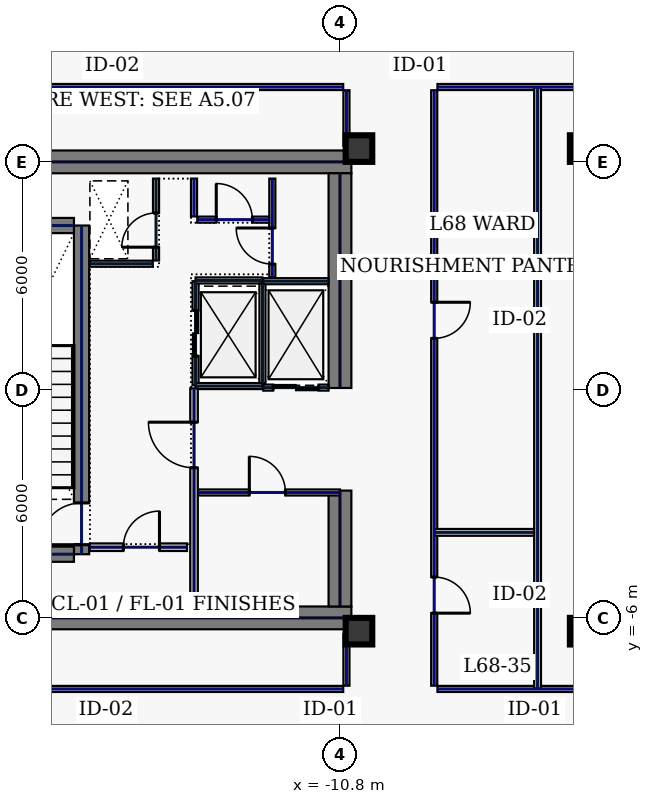
"""IFC4 building model, lengths in metres.
Left out: names, types, materials, properties, quantities, classifications, styles, units other than length and angle.
Written with IfcOpenShell. Run it as: python <this file> out.ifc"""

import sys

from ifc_helpers import new_model, si_unit, direction, frame, frame_2d, origin, origin_2d, place, context, subcontext, project, spatial, rectangle, hollow_rectangle, extrude, element, fill, save


model = new_model("IFC4")
c1 = context("Model", 3, precision=1e-05, world=origin(), true_north=direction((0.0, 1.0)))
c2 = subcontext(c1, "Body", "Model", "MODEL_VIEW")
j1 = project(units=[si_unit("LENGTHUNIT", "METRE"), si_unit("PLANEANGLEUNIT", "RADIAN")], contexts=[c1])
p1 = place(None, origin())
s1 = spatial("IfcSite", under=j1, at=p1, CompositionType="ELEMENT")
p2 = place(p1, origin())
s2 = spatial("IfcBuilding", under=s1, at=p2, CompositionType="ELEMENT")
p3 = place(p2, frame((0.0, 0.0, 293.0)))
s3 = spatial("IfcBuildingStorey", under=s2, at=p3, CompositionType="ELEMENT", Elevation=293.0)
for number, where, z_axis, x_axis in (
    (1, (-22.0, 6.0, 0.0), (0.0, 0.0, 1.0), (1.0, 0.0, 0.0)),
    (2, (-22.0, -6.0, 0.0), (0.0, 0.0, 1.0), (1.0, 0.0, 0.0)),
):
    element("IfcWall", number, at=place(p3, frame(where, z_axis=z_axis, x_axis=x_axis)), inside=s3, PredefinedType="SHEAR", context=c2, shape_type="SweptSolid", body=[
        extrude(rectangle(XDim=11.5, YDim=0.6, at=frame_2d((5.75, 0.0))), origin(), (0.0, 0.0, 1.0), 3.74),
    ])
p4 = place(p3, frame((-10.8, -5.7, 0.0), z_axis=(0.0, 0.0, 1.0), x_axis=(0.0, 1.0, 0.0)))
e3 = element("IfcWall", 3, at=p4, inside=s3, PredefinedType="SHEAR", context=c2, shape_type="SweptSolid", body=[
    extrude(rectangle(XDim=3.05, YDim=0.6, at=frame_2d((1.525, 0.0))), origin(), (0.0, 0.0, 1.0), 3.74),
])
p5 = place(p3, frame((-10.8, 0.05, 0.0), z_axis=(0.0, 0.0, 1.0), x_axis=(0.0, 1.0, 0.0)))
e4 = element("IfcWall", 4, at=p5, inside=s3, PredefinedType="SHEAR", context=c2, shape_type="SweptSolid", body=[
    extrude(rectangle(XDim=5.65, YDim=0.6, at=frame_2d((2.825, 0.0))), origin(), (0.0, 0.0, 1.0), 3.74),
])
p6 = place(p3, frame((-17.6, -4.325, 0.0), z_axis=(0.0, 0.0, 1.0), x_axis=(0.0, 1.0, 0.0)))
e5 = element("IfcWall", 5, at=p6, inside=s3, PredefinedType="SHEAR", context=c2, shape_type="SweptSolid", body=[
    extrude(rectangle(XDim=8.65, YDim=0.4, at=frame_2d((4.325, 0.0))), origin(), (0.0, 0.0, 1.0), 3.74),
])
p7 = place(p6, frame((0.25, 0.0, 0.0)))
e6 = element("IfcOpeningElement", 6, at=p7, cuts=e5, PredefinedType="OPENING", context=c2, shape_type="SweptSolid", body=[
    extrude(rectangle(XDim=1.1, YDim=2.2, at=frame_2d((0.55, 1.1))), frame((0.0, 0.21, 0.0), z_axis=(0.0, -1.0, 0.0), x_axis=(1.0, 0.0, 0.0)), (0.0, 0.0, 1.0), 0.42),
])
for number, where, z_axis, x_axis in (
    (7, (-21.2, -4.325, 0.0), (0.0, 0.0, 1.0), (1.0, 0.0, 0.0)),
    (8, (-21.2, 4.325, 0.0), (0.0, 0.0, 1.0), (1.0, 0.0, 0.0)),
):
    element("IfcWall", number, at=place(p3, frame(where, z_axis=z_axis, x_axis=x_axis)), inside=s3, PredefinedType="SHEAR", context=c2, shape_type="SweptSolid", body=[
        extrude(rectangle(XDim=3.4, YDim=0.4, at=frame_2d((1.7, 0.0))), origin(), (0.0, 0.0, 1.0), 3.74),
    ])
for number, where, z_axis, x_axis in (
    (9, (-10.3, -6.35, 0.0), (0.0, 0.0, 1.0), (1.0, 0.0, 0.0)),
    (10, (-10.3, 6.35, 0.0), (0.0, 0.0, 1.0), (1.0, 0.0, 0.0)),
    (11, (-4.4, -6.35, 0.0), (0.0, 0.0, 1.0), (1.0, 0.0, 0.0)),
    (12, (-4.4, 6.35, 0.0), (0.0, 0.0, 1.0), (1.0, 0.0, 0.0)),
):
    element("IfcColumn", number, at=place(p3, frame(where, z_axis=z_axis, x_axis=x_axis)), inside=s3, PredefinedType="COLUMN", context=c2, shape_type="SweptSolid", body=[
        extrude(hollow_rectangle(XDim=0.7, YDim=0.7, WallThickness=0.032, at=origin_2d()), origin(), (0.0, 0.0, 1.0), 3.74),
    ])
p8 = place(p3, frame((-14.6, 0.12, 0.0), z_axis=(0.0, 0.0, 1.0), x_axis=(0.0, 1.0, 0.0)))
e13 = element("IfcWall", 13, at=p8, inside=s3, PredefinedType="PARTITIONING", context=c2, shape_type="SweptSolid", body=[
    extrude(rectangle(XDim=2.74, YDim=0.16, at=frame_2d((1.37, 0.0))), origin(), (0.0, 0.0, 1.0), 3.74),
])
p9 = place(p8, frame((0.77, 0.0, 0.0)))
e14 = element("IfcOpeningElement", 14, at=p9, cuts=e13, PredefinedType="OPENING", context=c2, shape_type="SweptSolid", body=[
    extrude(rectangle(XDim=1.2, YDim=2.2, at=frame_2d((0.6, 1.1))), frame((0.0, 0.09, 0.0), z_axis=(0.0, -1.0, 0.0), x_axis=(1.0, 0.0, 0.0)), (0.0, 0.0, 1.0), 0.18),
])
for number, where, z_axis, x_axis in (
    (15, (-14.6, 0.1, 0.0), (0.0, 0.0, 1.0), (1.0, 0.0, 0.0)),
    (16, (-14.6, 2.88, 0.0), (0.0, 0.0, 1.0), (1.0, 0.0, 0.0)),
):
    element("IfcWall", number, at=place(p3, frame(where, z_axis=z_axis, x_axis=x_axis)), inside=s3, PredefinedType="PARTITIONING", context=c2, shape_type="SweptSolid", body=[
        extrude(rectangle(XDim=1.76, YDim=0.16, at=frame_2d((0.88, 0.0))), origin(), (0.0, 0.0, 1.0), 3.74),
    ])
p10 = place(p3, frame((-12.84, 0.18, 0.0), z_axis=(0.0, 0.0, 1.0), x_axis=(0.0, 1.0, 0.0)))
e17 = element("IfcWall", 17, at=p10, inside=s3, PredefinedType="PARTITIONING", context=c2, shape_type="SweptSolid", body=[
    extrude(rectangle(XDim=2.62, YDim=0.16, at=frame_2d((1.31, 0.0))), origin(), (0.0, 0.0, 1.0), 3.74),
])
p11 = place(p3, frame((-12.82, 0.06, 0.0), z_axis=(0.0, 0.0, 1.0), x_axis=(1.0, 0.0, 0.0)))
e18 = element("IfcWall", 18, at=p11, inside=s3, PredefinedType="PARTITIONING", context=c2, shape_type="SweptSolid", body=[
    extrude(rectangle(XDim=1.72, YDim=0.16, at=frame_2d((0.86, 0.0))), origin(), (0.0, 0.0, 1.0), 3.74),
])
p12 = place(p11, frame((0.26, 0.0, 0.0)))
e19 = element("IfcOpeningElement", 19, at=p12, cuts=e18, PredefinedType="OPENING", context=c2, shape_type="SweptSolid", body=[
    extrude(rectangle(XDim=1.2, YDim=2.2, at=frame_2d((0.6, 1.1))), frame((0.0, 0.09, 0.0), z_axis=(0.0, -1.0, 0.0), x_axis=(1.0, 0.0, 0.0)), (0.0, 0.0, 1.0), 0.18),
])
p13 = place(p3, frame((-12.82, 2.86, 0.0), z_axis=(0.0, 0.0, 1.0), x_axis=(1.0, 0.0, 0.0)))
e20 = element("IfcWall", 20, at=p13, inside=s3, PredefinedType="PARTITIONING", context=c2, shape_type="SweptSolid", body=[
    extrude(rectangle(XDim=1.72, YDim=0.16, at=frame_2d((0.86, 0.0))), origin(), (0.0, 0.0, 1.0), 3.74),
])
p14 = place(p3, frame((-15.64, 3.405, 0.0), z_axis=(0.0, 0.0, 1.0), x_axis=(0.0, 1.0, 0.0)))
e21 = element("IfcWall", 21, at=p14, inside=s3, PredefinedType="PARTITIONING", context=c2, shape_type="SweptSolid", body=[
    extrude(rectangle(XDim=2.155, YDim=0.16, at=frame_2d((1.078, 0.0))), origin(), (0.0, 0.0, 1.0), 3.74),
])
p15 = place(p14, frame((0.35, 0.0, 0.0)))
e22 = element("IfcOpeningElement", 22, at=p15, cuts=e21, PredefinedType="OPENING", context=c2, shape_type="SweptSolid", body=[
    extrude(rectangle(XDim=0.9, YDim=2.2, at=frame_2d((0.45, 1.1))), frame((0.0, 0.09, 0.0), z_axis=(0.0, -1.0, 0.0), x_axis=(1.0, 0.0, 0.0)), (0.0, 0.0, 1.0), 0.18),
])
p16 = place(p3, frame((-17.38, 3.32, 0.0), z_axis=(0.0, 0.0, 1.0), x_axis=(1.0, 0.0, 0.0)))
e23 = element("IfcWall", 23, at=p16, inside=s3, PredefinedType="PARTITIONING", context=c2, shape_type="SweptSolid", body=[
    extrude(rectangle(XDim=1.655, YDim=0.16, at=frame_2d((0.827, 0.0))), origin(), (0.0, 0.0, 1.0), 3.74),
])
p17 = place(p3, frame((-17.38, -4.14, 0.0), z_axis=(0.0, 0.0, 1.0), x_axis=(1.0, 0.0, 0.0)))
e24 = element("IfcWall", 24, at=p17, inside=s3, PredefinedType="SOLIDWALL", context=c2, shape_type="SweptSolid", body=[
    extrude(rectangle(XDim=2.555, YDim=0.2, at=frame_2d((1.277, 0.0))), origin(), (0.0, 0.0, 1.0), 3.74),
])
p18 = place(p17, frame((0.88, 0.0, 0.0)))
e25 = element("IfcOpeningElement", 25, at=p18, cuts=e24, PredefinedType="OPENING", context=c2, shape_type="SweptSolid", body=[
    extrude(rectangle(XDim=0.95, YDim=2.2, at=frame_2d((0.475, 1.1))), frame((0.0, 0.11, 0.0), z_axis=(0.0, -1.0, 0.0), x_axis=(1.0, 0.0, 0.0)), (0.0, 0.0, 1.0), 0.22),
])
p19 = place(p3, frame((-14.535, -2.7, 0.0), z_axis=(0.0, 0.0, 1.0), x_axis=(1.0, 0.0, 0.0)))
e26 = element("IfcWall", 26, at=p19, inside=s3, PredefinedType="PARTITIONING", context=c2, shape_type="SweptSolid", body=[
    extrude(rectangle(XDim=3.735, YDim=0.16, at=frame_2d((1.867, 0.0))), origin(), (0.0, 0.0, 1.0), 3.74),
])
p20 = place(p19, frame((1.35, 0.0, 0.0)))
e27 = element("IfcOpeningElement", 27, at=p20, cuts=e26, PredefinedType="OPENING", context=c2, shape_type="SweptSolid", body=[
    extrude(rectangle(XDim=0.95, YDim=2.2, at=frame_2d((0.475, 1.1))), frame((0.0, 0.09, 0.0), z_axis=(0.0, -1.0, 0.0), x_axis=(1.0, 0.0, 0.0)), (0.0, 0.0, 1.0), 0.18),
])
p21 = place(p3, frame((-12.58, 2.96, 0.0), z_axis=(0.0, 0.0, 1.0), x_axis=(0.0, 1.0, 0.0)))
e28 = element("IfcWall", 28, at=p21, inside=s3, PredefinedType="PARTITIONING", context=c2, shape_type="SweptSolid", body=[
    extrude(rectangle(XDim=2.6, YDim=0.16, at=frame_2d((1.3, 0.0))), origin(), (0.0, 0.0, 1.0), 3.74),
])
p22 = place(p21, frame((0.35, 0.0, 0.0)))
e29 = element("IfcOpeningElement", 29, at=p22, cuts=e28, PredefinedType="OPENING", context=c2, shape_type="SweptSolid", body=[
    extrude(rectangle(XDim=0.95, YDim=2.2, at=frame_2d((0.475, 1.1))), frame((0.0, 0.09, 0.0), z_axis=(0.0, -1.0, 0.0), x_axis=(1.0, 0.0, 0.0)), (0.0, 0.0, 1.0), 0.18),
])
p23 = place(p3, frame((-14.555, 4.48, 0.0), z_axis=(0.0, 0.0, 1.0), x_axis=(1.0, 0.0, 0.0)))
e30 = element("IfcWall", 30, at=p23, inside=s3, PredefinedType="PARTITIONING", context=c2, shape_type="SweptSolid", body=[
    extrude(rectangle(XDim=1.89, YDim=0.16, at=frame_2d((0.945, 0.0))), origin(), (0.0, 0.0, 1.0), 3.74),
])
p24 = place(p23, frame((0.5, 0.0, 0.0)))
e31 = element("IfcOpeningElement", 31, at=p24, cuts=e30, PredefinedType="OPENING", context=c2, shape_type="SweptSolid", body=[
    extrude(rectangle(XDim=0.95, YDim=2.2, at=frame_2d((0.475, 1.1))), frame((0.0, 0.09, 0.0), z_axis=(0.0, -1.0, 0.0), x_axis=(1.0, 0.0, 0.0)), (0.0, 0.0, 1.0), 0.18),
])
p25 = place(p3, frame((-14.64, 4.565, 0.0), z_axis=(0.0, 0.0, 1.0), x_axis=(0.0, 1.0, 0.0)))
e32 = element("IfcWall", 32, at=p25, inside=s3, PredefinedType="PARTITIONING", context=c2, shape_type="SweptSolid", body=[
    extrude(rectangle(XDim=0.995, YDim=0.16, at=frame_2d((0.498, 0.0))), origin(), (0.0, 0.0, 1.0), 3.74),
])
p26 = place(p3, frame((-14.64, -5.56, 0.0), z_axis=(0.0, 0.0, 1.0), x_axis=(0.0, 1.0, 0.0)))
e33 = element("IfcWall", 33, at=p26, inside=s3, PredefinedType="SOLIDWALL", context=c2, shape_type="SweptSolid", body=[
    extrude(rectangle(XDim=5.6, YDim=0.2, at=frame_2d((2.8, 0.0))), origin(), (0.0, 0.0, 1.0), 3.74),
])
p27 = place(p26, frame((3.51, 0.0, 0.0)))
e34 = element("IfcOpeningElement", 34, at=p27, cuts=e33, PredefinedType="OPENING", context=c2, shape_type="SweptSolid", body=[
    extrude(rectangle(XDim=1.2, YDim=2.2, at=frame_2d((0.6, 1.1))), frame((0.0, 0.11, 0.0), z_axis=(0.0, -1.0, 0.0), x_axis=(1.0, 0.0, 0.0)), (0.0, 0.0, 1.0), 0.22),
])
p28 = place(p3, frame((-3.965, 7.97, 0.0), z_axis=(0.0, 0.0, 1.0), x_axis=(-1.0, 0.0, 0.0)))
e35 = element("IfcWall", 35, at=p28, inside=s3, PredefinedType="PARTITIONING", context=c2, shape_type="SweptSolid", body=[
    extrude(rectangle(XDim=4.27, YDim=0.16, at=frame_2d((2.135, 0.0))), origin(), (0.0, 0.0, 1.0), 3.74),
])
p29 = place(p3, frame((-8.32, 7.885, 0.0), z_axis=(0.0, 0.0, 1.0), x_axis=(0.0, -1.0, 0.0)))
e36 = element("IfcWall", 36, at=p29, inside=s3, PredefinedType="PARTITIONING", context=c2, shape_type="SweptSolid", body=[
    extrude(rectangle(XDim=15.67, YDim=0.16, at=frame_2d((7.835, 0.0))), origin(), (0.0, 0.0, 1.0), 3.74),
])
p30 = place(p29, frame((12.811, 0.0, 0.0)))
e37 = element("IfcOpeningElement", 37, at=p30, cuts=e36, PredefinedType="OPENING", context=c2, shape_type="SweptSolid", body=[
    extrude(rectangle(XDim=0.95, YDim=2.2, at=frame_2d((0.475, 1.1))), frame((0.0, 0.09, 0.0), z_axis=(0.0, -1.0, 0.0), x_axis=(1.0, 0.0, 0.0)), (0.0, 0.0, 1.0), 0.18),
])
p31 = place(p29, frame((5.579, 0.0, 0.0)))
e38 = element("IfcOpeningElement", 38, at=p31, cuts=e36, PredefinedType="OPENING", context=c2, shape_type="SweptSolid", body=[
    extrude(rectangle(XDim=0.95, YDim=2.2, at=frame_2d((0.475, 1.1))), frame((0.0, 0.09, 0.0), z_axis=(0.0, -1.0, 0.0), x_axis=(1.0, 0.0, 0.0)), (0.0, 0.0, 1.0), 0.18),
])
p32 = place(p3, frame((-8.235, -7.87, 0.0), z_axis=(0.0, 0.0, 1.0), x_axis=(1.0, 0.0, 0.0)))
e39 = element("IfcWall", 39, at=p32, inside=s3, PredefinedType="PARTITIONING", context=c2, shape_type="SweptSolid", body=[
    extrude(rectangle(XDim=4.27, YDim=0.16, at=frame_2d((2.135, 0.0))), origin(), (0.0, 0.0, 1.0), 3.74),
])
p33 = place(p3, frame((-10.63, -7.785, 0.0), z_axis=(0.0, 0.0, 1.0), x_axis=(0.0, 1.0, 0.0)))
e40 = element("IfcWall", 40, at=p33, inside=s3, PredefinedType="PARTITIONING", context=c2, shape_type="SweptSolid", body=[
    extrude(rectangle(XDim=1.365, YDim=0.16, at=frame_2d((0.683, 0.0))), origin(), (0.0, 0.0, 1.0), 3.74),
])
p34 = place(p3, frame((-10.63, 6.42, 0.0), z_axis=(0.0, 0.0, 1.0), x_axis=(0.0, 1.0, 0.0)))
e41 = element("IfcWall", 41, at=p34, inside=s3, PredefinedType="PARTITIONING", context=c2, shape_type="SweptSolid", body=[
    extrude(rectangle(XDim=1.465, YDim=0.16, at=frame_2d((0.732, 0.0))), origin(), (0.0, 0.0, 1.0), 3.74),
])
for number, where, z_axis, x_axis in (
    (42, (-10.715, 7.97, 0.0), (0.0, 0.0, 1.0), (-1.0, 0.0, 0.0)),
    (43, (-21.915, -7.87, 0.0), (0.0, 0.0, 1.0), (1.0, 0.0, 0.0)),
):
    element("IfcWall", number, at=place(p3, frame(where, z_axis=z_axis, x_axis=x_axis)), inside=s3, PredefinedType="PARTITIONING", context=c2, shape_type="SweptSolid", body=[
        extrude(rectangle(XDim=11.2, YDim=0.16, at=frame_2d((5.6, 0.0))), origin(), (0.0, 0.0, 1.0), 3.74),
    ])
p35 = place(p3, frame((-5.6, -7.865, 0.0), z_axis=(0.0, 0.0, 1.0), x_axis=(0.0, 1.0, 0.0)))
e44 = element("IfcWall", 44, at=p35, inside=s3, PredefinedType="PARTITIONING", context=c2, shape_type="SweptSolid", body=[
    extrude(rectangle(XDim=15.83, YDim=0.18, at=frame_2d((7.915, 0.0))), origin(), (0.0, 0.0, 1.0), 3.74),
])
p36 = place(p3, frame((-8.315, -3.75, 0.0), z_axis=(0.0, 0.0, 1.0), x_axis=(1.0, 0.0, 0.0)))
e45 = element("IfcWall", 45, at=p36, inside=s3, PredefinedType="PARTITIONING", context=c2, shape_type="SweptSolid", body=[
    extrude(rectangle(XDim=2.62, YDim=0.18, at=frame_2d((1.31, 0.0))), origin(), (0.0, 0.0, 1.0), 3.74),
])
p37 = place(p7, origin())
e46 = element("IfcDoor", 46, at=p37, inside=s3, OperationType="SINGLE_SWING_LEFT", PredefinedType="DOOR", context=c2, shape_type="SweptSolid", body=[
    extrude(rectangle(XDim=1.1, YDim=2.2, at=frame_2d((0.55, 1.1))), frame((0.0, 0.025, 0.0), z_axis=(0.0, -1.0, 0.0), x_axis=(1.0, 0.0, 0.0)), (0.0, 0.0, 1.0), 0.05),
])
fill(e6, e46)
p38 = place(p9, origin())
e47 = element("IfcDoor", 47, at=p38, inside=s3, OperationType="SLIDING_TO_LEFT", PredefinedType="DOOR", context=c2, shape_type="SweptSolid", body=[
    extrude(rectangle(XDim=1.2, YDim=2.2, at=frame_2d((0.6, 1.1))), frame((0.0, 0.025, 0.0), z_axis=(0.0, -1.0, 0.0), x_axis=(1.0, 0.0, 0.0)), (0.0, 0.0, 1.0), 0.05),
])
fill(e14, e47)
p39 = place(p12, origin())
e48 = element("IfcDoor", 48, at=p39, inside=s3, OperationType="SLIDING_TO_LEFT", PredefinedType="DOOR", context=c2, shape_type="SweptSolid", body=[
    extrude(rectangle(XDim=1.2, YDim=2.2, at=frame_2d((0.6, 1.1))), frame((0.0, 0.025, 0.0), z_axis=(0.0, -1.0, 0.0), x_axis=(1.0, 0.0, 0.0)), (0.0, 0.0, 1.0), 0.05),
])
fill(e19, e48)
p40 = place(p15, origin())
e49 = element("IfcDoor", 49, at=p40, inside=s3, OperationType="SINGLE_SWING_LEFT", PredefinedType="DOOR", context=c2, shape_type="SweptSolid", body=[
    extrude(rectangle(XDim=0.9, YDim=2.2, at=frame_2d((0.45, 1.1))), frame((0.0, 0.025, 0.0), z_axis=(0.0, -1.0, 0.0), x_axis=(1.0, 0.0, 0.0)), (0.0, 0.0, 1.0), 0.05),
])
fill(e22, e49)
p41 = place(p18, origin())
e50 = element("IfcDoor", 50, at=p41, inside=s3, OperationType="SINGLE_SWING_RIGHT", PredefinedType="DOOR", context=c2, shape_type="SweptSolid", body=[
    extrude(rectangle(XDim=0.95, YDim=2.2, at=frame_2d((0.475, 1.1))), frame((0.0, 0.025, 0.0), z_axis=(0.0, -1.0, 0.0), x_axis=(1.0, 0.0, 0.0)), (0.0, 0.0, 1.0), 0.05),
])
fill(e25, e50)
p42 = place(p20, origin())
e51 = element("IfcDoor", 51, at=p42, inside=s3, OperationType="SINGLE_SWING_LEFT", PredefinedType="DOOR", context=c2, shape_type="SweptSolid", body=[
    extrude(rectangle(XDim=0.95, YDim=2.2, at=frame_2d((0.475, 1.1))), frame((0.0, 0.025, 0.0), z_axis=(0.0, -1.0, 0.0), x_axis=(1.0, 0.0, 0.0)), (0.0, 0.0, 1.0), 0.05),
])
fill(e27, e51)
p43 = place(p22, origin())
e52 = element("IfcDoor", 52, at=p43, inside=s3, OperationType="SINGLE_SWING_RIGHT", PredefinedType="DOOR", context=c2, shape_type="SweptSolid", body=[
    extrude(rectangle(XDim=0.95, YDim=2.2, at=frame_2d((0.475, 1.1))), frame((0.0, 0.025, 0.0), z_axis=(0.0, -1.0, 0.0), x_axis=(1.0, 0.0, 0.0)), (0.0, 0.0, 1.0), 0.05),
])
fill(e29, e52)
p44 = place(p24, origin())
e53 = element("IfcDoor", 53, at=p44, inside=s3, OperationType="SINGLE_SWING_LEFT", PredefinedType="DOOR", context=c2, shape_type="SweptSolid", body=[
    extrude(rectangle(XDim=0.95, YDim=2.2, at=frame_2d((0.475, 1.1))), frame((0.0, 0.025, 0.0), z_axis=(0.0, -1.0, 0.0), x_axis=(1.0, 0.0, 0.0)), (0.0, 0.0, 1.0), 0.05),
])
fill(e31, e53)
p45 = place(p27, origin())
e54 = element("IfcDoor", 54, at=p45, inside=s3, OperationType="SINGLE_SWING_RIGHT", PredefinedType="DOOR", context=c2, shape_type="SweptSolid", body=[
    extrude(rectangle(XDim=1.2, YDim=2.2, at=frame_2d((0.6, 1.1))), frame((0.0, 0.025, 0.0), z_axis=(0.0, -1.0, 0.0), x_axis=(1.0, 0.0, 0.0)), (0.0, 0.0, 1.0), 0.05),
])
fill(e34, e54)
p46 = place(p30, origin())
e55 = element("IfcDoor", 55, at=p46, inside=s3, OperationType="SINGLE_SWING_RIGHT", PredefinedType="DOOR", context=c2, shape_type="SweptSolid", body=[
    extrude(rectangle(XDim=0.95, YDim=2.2, at=frame_2d((0.475, 1.1))), frame((0.0, 0.025, 0.0), z_axis=(0.0, -1.0, 0.0), x_axis=(1.0, 0.0, 0.0)), (0.0, 0.0, 1.0), 0.05),
])
fill(e37, e55)
p47 = place(p31, origin())
e56 = element("IfcDoor", 56, at=p47, inside=s3, OperationType="SINGLE_SWING_LEFT", PredefinedType="DOOR", context=c2, shape_type="SweptSolid", body=[
    extrude(rectangle(XDim=0.95, YDim=2.2, at=frame_2d((0.475, 1.1))), frame((0.0, 0.025, 0.0), z_axis=(0.0, -1.0, 0.0), x_axis=(1.0, 0.0, 0.0)), (0.0, 0.0, 1.0), 0.05),
])
fill(e38, e56)
save(model, sys.argv[1])
